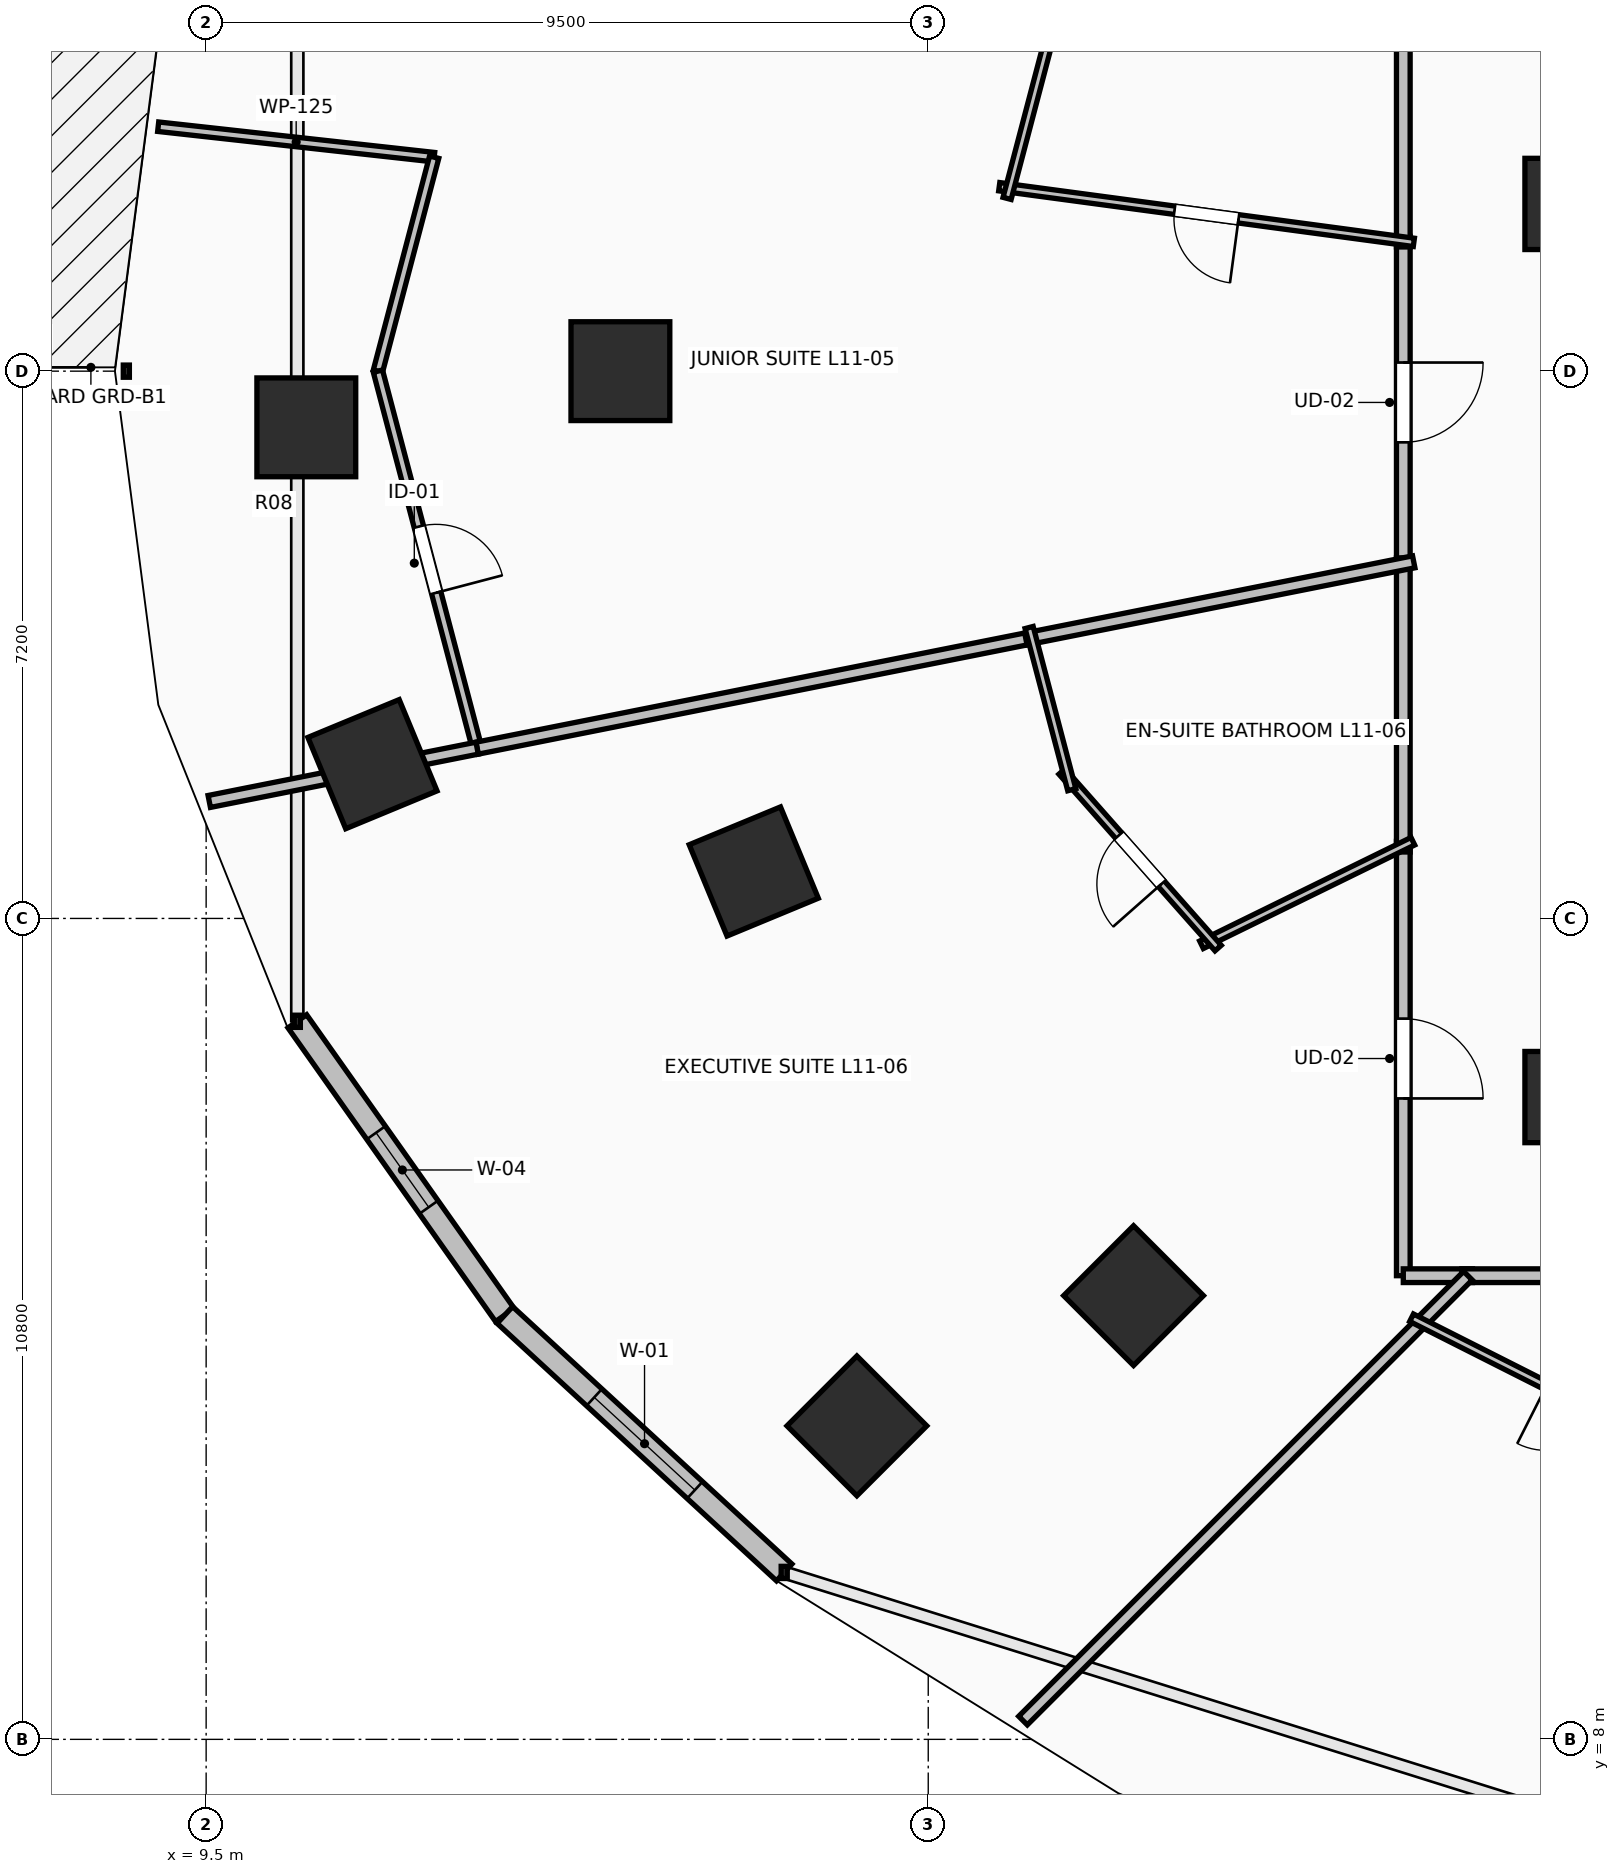
"""IFC4 building model, lengths in metres.
Left out: names, types, materials, properties, quantities, classifications, styles, units other than length and angle.
Written with IfcOpenShell. Run it as: python <this file> out.ifc"""

import sys

from ifc_helpers import new_model, si_unit, direction, frame, frame_2d, origin, origin_2d, place, context, subcontext, project, spatial, rectangle, extrude, element, fill, save


model = new_model("IFC4")
c1 = context("Model", 3, precision=1e-05, world=origin(), true_north=direction((0.0, 1.0)))
c2 = subcontext(c1, "Body", "Model", "MODEL_VIEW")
j1 = project(units=[si_unit("LENGTHUNIT", "METRE"), si_unit("PLANEANGLEUNIT", "RADIAN")], contexts=[c1])
p1 = place(None, origin())
s1 = spatial("IfcSite", under=j1, at=p1, CompositionType="ELEMENT")
p2 = place(p1, origin())
s2 = spatial("IfcBuilding", under=s1, at=p2, CompositionType="ELEMENT")
p3 = place(p2, frame((0.0, 0.0, 45.0)))
s3 = spatial("IfcBuildingStorey", under=s2, at=p3, CompositionType="ELEMENT", Elevation=45.0)
for number, where, z_axis, x_axis in (
    (1, (14.95, 26.0, 0.0), (0.0, 0.0, 1.0), (-1.0, 0.0, 0.0)),
    (2, (16.705, 19.418, 0.0), (0.0, 0.0, 1.0), (-0.924, -0.383, 0.0)),
    (3, (21.701, 13.838, 0.0), (0.0, 0.0, 1.0), (-0.707, -0.707, 0.0)),
    (4, (10.818, 25.261, 0.0), (0.0, 0.0, 1.0), (-1.0, 0.0, 0.0)),
    (5, (11.688, 20.83, 0.0), (0.0, 0.0, 1.0), (-0.924, -0.383, 0.0)),
    (6, (18.061, 12.124, 0.0), (0.0, 0.0, 1.0), (-0.707, -0.707, 0.0)),
):
    element("IfcColumn", number, at=place(p3, frame(where, z_axis=z_axis, x_axis=x_axis)), inside=s3, PredefinedType="COLUMN", context=c2, shape_type="SweptSolid", body=[
        extrude(rectangle(XDim=1.3, YDim=1.3, at=origin_2d()), origin(), (0.0, 0.0, 1.0), 3.5),
    ])
for number, where, z_axis, x_axis in (
    (7, (27.25, 16.45, 0.0), (0.0, 0.0, 1.0), (1.0, 0.0, 0.0)),
    (8, (27.25, 28.2, 0.0), (0.0, 0.0, 1.0), (1.0, 0.0, 0.0)),
):
    element("IfcColumn", number, at=place(p3, frame(where, z_axis=z_axis, x_axis=x_axis)), inside=s3, PredefinedType="PILASTER", context=c2, shape_type="SweptSolid", body=[
        extrude(rectangle(XDim=0.8, YDim=1.2, at=origin_2d()), origin(), (0.0, 0.0, 1.0), 3.5),
    ])
p4 = place(p3, frame((10.699, 17.447, 0.0), z_axis=(0.0, 0.0, 1.0), x_axis=(0.577130815624, -0.816651713803, 0.0)))
e9 = element("IfcWall", 9, at=p4, inside=s3, PredefinedType="STANDARD", context=c2, shape_type="SweptSolid", body=[
    extrude(rectangle(XDim=4.731, YDim=0.3, at=frame_2d((2.366, 0.0))), origin(), (0.0, 0.0, 1.0), 3.24),
])
p5 = place(p4, frame((1.795, 0.0, 0.85)))
e10 = element("IfcOpeningElement", 10, at=p5, cuts=e9, PredefinedType="OPENING", context=c2, shape_type="SweptSolid", body=[
    extrude(rectangle(XDim=1.2, YDim=1.95, at=frame_2d((0.6, 0.975))), frame((0.0, 0.165, 0.0), z_axis=(0.0, -1.0, 0.0), x_axis=(1.0, 0.0, 0.0)), (0.0, 0.0, 1.0), 0.33),
])
p6 = place(p3, frame((13.43, 13.583, 0.0), z_axis=(0.0, 0.0, 1.0), x_axis=(0.735342629635, -0.677695519419, 0.0)))
e11 = element("IfcWall", 11, at=p6, inside=s3, PredefinedType="STANDARD", context=c2, shape_type="SweptSolid", body=[
    extrude(rectangle(XDim=4.997, YDim=0.3, at=frame_2d((2.499, 0.0))), origin(), (0.0, 0.0, 1.0), 3.24),
])
p7 = place(p6, frame((1.599, 0.0, 0.85)))
e12 = element("IfcOpeningElement", 12, at=p7, cuts=e11, PredefinedType="OPENING", context=c2, shape_type="SweptSolid", body=[
    extrude(rectangle(XDim=1.8, YDim=2.19, at=frame_2d((0.9, 1.095))), frame((0.0, 0.165, 0.0), z_axis=(0.0, -1.0, 0.0), x_axis=(1.0, 0.0, 0.0)), (0.0, 0.0, 1.0), 0.33),
])
p8 = place(p3, frame((25.25, 27.774, 0.0), z_axis=(0.0, 0.0, 1.0), x_axis=(0.0, -1.0, 0.0)))
e13 = element("IfcWall", 13, at=p8, inside=s3, PredefinedType="PARTITIONING", context=c2, shape_type="SweptSolid", body=[
    extrude(rectangle(XDim=4.371, YDim=0.18, at=frame_2d((2.186, 0.0))), origin(), (0.0, 0.0, 1.0), 2.432),
])
p9 = place(p8, frame((1.66, 0.0, 0.0)))
e14 = element("IfcOpeningElement", 14, at=p9, cuts=e13, PredefinedType="OPENING", context=c2, shape_type="SweptSolid", body=[
    extrude(rectangle(XDim=1.05, YDim=2.2, at=frame_2d((0.525, 1.1))), frame((0.0, 0.105, 0.0), z_axis=(0.0, -1.0, 0.0), x_axis=(1.0, 0.0, 0.0)), (0.0, 0.0, 1.0), 0.21),
])
p10 = place(p3, frame((25.25, 31.361, 0.0), z_axis=(0.0, 0.0, 1.0), x_axis=(0.0, -1.0, 0.0)))
e15 = element("IfcWall", 15, at=p10, inside=s3, PredefinedType="PARTITIONING", context=c2, shape_type="SweptSolid", body=[
    extrude(rectangle(XDim=3.727, YDim=0.18, at=frame_2d((1.864, 0.0))), origin(), (0.0, 0.0, 1.0), 2.432),
])
p11 = place(p3, frame((25.25, 19.814, 0.0), z_axis=(0.0, 0.0, 1.0), x_axis=(0.0, -1.0, 0.0)))
e16 = element("IfcWall", 16, at=p11, inside=s3, PredefinedType="PARTITIONING", context=c2, shape_type="SweptSolid", body=[
    extrude(rectangle(XDim=5.714, YDim=0.18, at=frame_2d((2.857, 0.0))), origin(), (0.0, 0.0, 1.0), 2.432),
])
p12 = place(p11, frame((2.332, 0.0, 0.0)))
e17 = element("IfcOpeningElement", 17, at=p12, cuts=e16, PredefinedType="OPENING", context=c2, shape_type="SweptSolid", body=[
    extrude(rectangle(XDim=1.05, YDim=2.2, at=frame_2d((0.525, 1.1))), frame((0.0, 0.105, 0.0), z_axis=(0.0, -1.0, 0.0), x_axis=(1.0, 0.0, 0.0)), (0.0, 0.0, 1.0), 0.21),
])
p13 = place(p3, frame((25.25, 14.1, 0.0), z_axis=(0.0, 0.0, 1.0), x_axis=(1.0, 0.0, 0.0)))
e18 = element("IfcWall", 18, at=p13, inside=s3, PredefinedType="PARTITIONING", context=c2, shape_type="SweptSolid", body=[
    extrude(rectangle(XDim=0.91, YDim=0.18, at=frame_2d((0.455, 0.0))), origin(), (0.0, 0.0, 1.0), 2.886),
])
p14 = place(p3, frame((25.25, 23.543, 0.0), z_axis=(0.0, 0.0, 1.0), x_axis=(0.0, -1.0, 0.0)))
e19 = element("IfcWall", 19, at=p14, inside=s3, PredefinedType="PARTITIONING", context=c2, shape_type="SweptSolid", body=[
    extrude(rectangle(XDim=3.869, YDim=0.18, at=frame_2d((1.935, 0.0))), origin(), (0.0, 0.0, 1.0), 3.24),
])
p15 = place(p3, frame((26.02, 14.1, 0.0), z_axis=(0.0, 0.0, 1.0), x_axis=(1.0, 0.0, 0.0)))
e20 = element("IfcWall", 20, at=p15, inside=s3, PredefinedType="PARTITIONING", context=c2, shape_type="SweptSolid", body=[
    extrude(rectangle(XDim=5.139, YDim=0.18, at=frame_2d((2.569, 0.0))), origin(), (0.0, 0.0, 1.0), 2.432),
])
p16 = place(p3, frame((25.389, 27.694, 0.0), z_axis=(0.0, 0.0, 1.0), x_axis=(-0.991111683087, 0.133032445848, 0.0)))
e21 = element("IfcWall", 21, at=p16, inside=s3, PredefinedType="PARTITIONING", context=c2, shape_type="SweptSolid", body=[
    extrude(rectangle(XDim=5.504, YDim=0.11, at=frame_2d((2.752, 0.0))), origin(), (0.0, 0.0, 1.0), 2.432),
])
p17 = place(p16, frame((2.327, 0.0, 0.0)))
e22 = element("IfcOpeningElement", 22, at=p17, cuts=e21, PredefinedType="OPENING", context=c2, shape_type="SweptSolid", body=[
    extrude(rectangle(XDim=0.85, YDim=2.1, at=frame_2d((0.425, 1.05))), frame((0.0, 0.07, 0.0), z_axis=(0.0, -1.0, 0.0), x_axis=(1.0, 0.0, 0.0)), (0.0, 0.0, 1.0), 0.14),
])
p18 = place(p3, frame((20.037, 28.273, 0.0), z_axis=(0.0, 0.0, 1.0), x_axis=(0.254593926267, 0.967048050878, 0.0)))
e23 = element("IfcWall", 23, at=p18, inside=s3, PredefinedType="PARTITIONING", context=c2, shape_type="SweptSolid", body=[
    extrude(rectangle(XDim=3.344, YDim=0.11, at=frame_2d((1.672, 0.0))), origin(), (0.0, 0.0, 1.0), 2.432),
])
p19 = place(p3, frame((8.869, 29.216, 0.0), z_axis=(0.0, 0.0, 1.0), x_axis=(0.99395362386, -0.109800699523, 0.0)))
e24 = element("IfcWall", 24, at=p19, inside=s3, PredefinedType="PARTITIONING", context=c2, shape_type="SweptSolid", body=[
    extrude(rectangle(XDim=3.653, YDim=0.125, at=frame_2d((1.827, 0.0))), origin(), (0.0, 0.0, 1.0), 2.624),
])
p20 = place(p3, frame((12.5, 28.815, 0.0), z_axis=(0.0, 0.0, 1.0), x_axis=(-0.254241432202, -0.967140783005, 0.0)))
e25 = element("IfcWall", 25, at=p20, inside=s3, PredefinedType="PARTITIONING", context=c2, shape_type="SweptSolid", body=[
    extrude(rectangle(XDim=2.911, YDim=0.125, at=frame_2d((1.455, 0.0))), origin(), (0.0, 0.0, 1.0), 3.24),
])
p21 = place(p3, frame((11.76, 26.0, 0.0), z_axis=(0.0, 0.0, 1.0), x_axis=(0.254434720755, -0.967089950767, 0.0)))
e26 = element("IfcWall", 26, at=p21, inside=s3, PredefinedType="PARTITIONING", context=c2, shape_type="SweptSolid", body=[
    extrude(rectangle(XDim=5.129, YDim=0.125, at=frame_2d((2.564, 0.0))), origin(), (0.0, 0.0, 1.0), 2.432),
])
p22 = place(p21, frame((2.115, 0.0, 0.0)))
e27 = element("IfcOpeningElement", 27, at=p22, cuts=e26, PredefinedType="OPENING", context=c2, shape_type="SweptSolid", body=[
    extrude(rectangle(XDim=0.9, YDim=2.1, at=frame_2d((0.45, 1.05))), frame((0.0, 0.077, 0.0), z_axis=(0.0, -1.0, 0.0), x_axis=(1.0, 0.0, 0.0)), (0.0, 0.0, 1.0), 0.155),
])
p23 = place(p3, frame((13.065, 21.04, 0.0), z_axis=(0.0, 0.0, 1.0), x_axis=(0.980774220135, 0.195145917502, 0.0)))
e28 = element("IfcWall", 28, at=p23, inside=s3, PredefinedType="PARTITIONING", context=c2, shape_type="SweptSolid", body=[
    extrude(rectangle(XDim=7.501, YDim=0.16, at=frame_2d((3.751, 0.0))), origin(), (0.0, 0.0, 1.0), 2.972),
])
p24 = place(p3, frame((20.285, 22.476, 0.0), z_axis=(0.0, 0.0, 1.0), x_axis=(0.980785905074, 0.195087181559, 0.0)))
e29 = element("IfcWall", 29, at=p24, inside=s3, PredefinedType="PARTITIONING", context=c2, shape_type="SweptSolid", body=[
    extrude(rectangle(XDim=5.202, YDim=0.16, at=frame_2d((2.601, 0.0))), origin(), (0.0, 0.0, 1.0), 2.886),
])
p25 = place(p3, frame((9.541, 20.339, 0.0), z_axis=(0.0, 0.0, 1.0), x_axis=(0.980786594985, 0.195083713053, 0.0)))
e30 = element("IfcWall", 30, at=p25, inside=s3, PredefinedType="PARTITIONING", context=c2, shape_type="SweptSolid", body=[
    extrude(rectangle(XDim=3.593, YDim=0.16, at=frame_2d((1.796, 0.0))), origin(), (0.0, 0.0, 1.0), 2.432),
])
p26 = place(p3, frame((25.376, 19.816, 0.0), z_axis=(0.0, 0.0, 1.0), x_axis=(-0.89800930559, -0.439976461954, 0.0)))
e31 = element("IfcWall", 31, at=p26, inside=s3, PredefinedType="PARTITIONING", context=c2, shape_type="SweptSolid", body=[
    extrude(rectangle(XDim=3.096, YDim=0.11, at=frame_2d((1.548, 0.0))), origin(), (0.0, 0.0, 1.0), 3.24),
])
p27 = place(p3, frame((22.814, 18.41, 0.0), z_axis=(0.0, 0.0, 1.0), x_axis=(-0.662186487972, 0.749339078887, 0.0)))
e32 = element("IfcWall", 32, at=p27, inside=s3, PredefinedType="PARTITIONING", context=c2, shape_type="SweptSolid", body=[
    extrude(rectangle(XDim=3.101, YDim=0.11, at=frame_2d((1.551, 0.0))), origin(), (0.0, 0.0, 1.0), 2.886),
])
p28 = place(p27, frame((1.125, 0.0, 0.0)))
e33 = element("IfcOpeningElement", 33, at=p28, cuts=e32, PredefinedType="OPENING", context=c2, shape_type="SweptSolid", body=[
    extrude(rectangle(XDim=0.85, YDim=2.1, at=frame_2d((0.425, 1.05))), frame((0.0, 0.07, 0.0), z_axis=(0.0, -1.0, 0.0), x_axis=(1.0, 0.0, 0.0)), (0.0, 0.0, 1.0), 0.14),
])
p29 = place(p3, frame((20.889, 20.494, 0.0), z_axis=(0.0, 0.0, 1.0), x_axis=(-0.254389812051, 0.967101764823, 0.0)))
e34 = element("IfcWall", 34, at=p29, inside=s3, PredefinedType="PARTITIONING", context=c2, shape_type="SweptSolid", body=[
    extrude(rectangle(XDim=2.206, YDim=0.11, at=frame_2d((1.103, 0.0))), origin(), (0.0, 0.0, 1.0), 3.24),
])
p30 = place(p3, frame((20.247, 8.247, 0.0), z_axis=(0.0, 0.0, 1.0), x_axis=(0.707106781187, 0.707106781187, 0.0)))
e35 = element("IfcWall", 35, at=p30, inside=s3, PredefinedType="PARTITIONING", context=c2, shape_type="SweptSolid", body=[
    extrude(rectangle(XDim=8.277, YDim=0.16, at=frame_2d((4.139, 0.0))), origin(), (0.0, 0.0, 1.0), 2.624),
])
p31 = place(p3, frame((29.665, 11.372, 0.0), z_axis=(0.0, 0.0, 1.0), x_axis=(-0.892577568201, 0.450893873039, 0.0)))
e36 = element("IfcWall", 36, at=p31, inside=s3, PredefinedType="PARTITIONING", context=c2, shape_type="SweptSolid", body=[
    extrude(rectangle(XDim=4.824, YDim=0.11, at=frame_2d((2.412, 0.0))), origin(), (0.0, 0.0, 1.0), 2.432),
])
p32 = place(p31, frame((1.987, 0.0, 0.0)))
e37 = element("IfcOpeningElement", 37, at=p32, cuts=e36, PredefinedType="OPENING", context=c2, shape_type="SweptSolid", body=[
    extrude(rectangle(XDim=0.85, YDim=2.1, at=frame_2d((0.425, 1.05))), frame((0.0, 0.07, 0.0), z_axis=(0.0, -1.0, 0.0), x_axis=(1.0, 0.0, 0.0)), (0.0, 0.0, 1.0), 0.14),
])
p33 = place(p5, origin())
e38 = element("IfcWindow", 38, at=p33, inside=s3, PartitioningType="SINGLE_PANEL", PredefinedType="WINDOW", context=c2, shape_type="SweptSolid", body=[
    extrude(rectangle(XDim=1.2, YDim=1.95, at=frame_2d((0.6, 0.975))), frame((0.0, 0.03, 0.0), z_axis=(0.0, -1.0, 0.0), x_axis=(1.0, 0.0, 0.0)), (0.0, 0.0, 1.0), 0.06),
])
fill(e10, e38)
p34 = place(p7, origin())
e39 = element("IfcWindow", 39, at=p34, inside=s3, PartitioningType="SINGLE_PANEL", PredefinedType="WINDOW", context=c2, shape_type="SweptSolid", body=[
    extrude(rectangle(XDim=1.8, YDim=2.19, at=frame_2d((0.9, 1.095))), frame((0.0, 0.03, 0.0), z_axis=(0.0, -1.0, 0.0), x_axis=(1.0, 0.0, 0.0)), (0.0, 0.0, 1.0), 0.06),
])
fill(e12, e39)
p35 = place(p9, origin())
e40 = element("IfcDoor", 40, at=p35, inside=s3, OperationType="SINGLE_SWING_LEFT", PredefinedType="DOOR", context=c2, shape_type="SweptSolid", body=[
    extrude(rectangle(XDim=1.05, YDim=2.2, at=frame_2d((0.525, 1.1))), frame((0.0, 0.025, 0.0), z_axis=(0.0, -1.0, 0.0), x_axis=(1.0, 0.0, 0.0)), (0.0, 0.0, 1.0), 0.05),
])
fill(e14, e40)
p36 = place(p12, origin())
e41 = element("IfcDoor", 41, at=p36, inside=s3, OperationType="SINGLE_SWING_RIGHT", PredefinedType="DOOR", context=c2, shape_type="SweptSolid", body=[
    extrude(rectangle(XDim=1.05, YDim=2.2, at=frame_2d((0.525, 1.1))), frame((0.0, 0.025, 0.0), z_axis=(0.0, -1.0, 0.0), x_axis=(1.0, 0.0, 0.0)), (0.0, 0.0, 1.0), 0.05),
])
fill(e17, e41)
p37 = place(p17, origin())
e42 = element("IfcDoor", 42, at=p37, inside=s3, OperationType="SINGLE_SWING_LEFT", PredefinedType="DOOR", context=c2, shape_type="SweptSolid", body=[
    extrude(rectangle(XDim=0.85, YDim=2.1, at=frame_2d((0.425, 1.05))), frame((0.0, 0.025, 0.0), z_axis=(0.0, -1.0, 0.0), x_axis=(1.0, 0.0, 0.0)), (0.0, 0.0, 1.0), 0.05),
])
fill(e22, e42)
p38 = place(p22, origin())
e43 = element("IfcDoor", 43, at=p38, inside=s3, OperationType="SINGLE_SWING_RIGHT", PredefinedType="DOOR", context=c2, shape_type="SweptSolid", body=[
    extrude(rectangle(XDim=0.9, YDim=2.1, at=frame_2d((0.45, 1.05))), frame((0.0, 0.025, 0.0), z_axis=(0.0, -1.0, 0.0), x_axis=(1.0, 0.0, 0.0)), (0.0, 0.0, 1.0), 0.05),
])
fill(e27, e43)
p39 = place(p28, origin())
e44 = element("IfcDoor", 44, at=p39, inside=s3, OperationType="SINGLE_SWING_LEFT", PredefinedType="DOOR", context=c2, shape_type="SweptSolid", body=[
    extrude(rectangle(XDim=0.85, YDim=2.1, at=frame_2d((0.425, 1.05))), frame((0.0, 0.025, 0.0), z_axis=(0.0, -1.0, 0.0), x_axis=(1.0, 0.0, 0.0)), (0.0, 0.0, 1.0), 0.05),
])
fill(e33, e44)
save(model, sys.argv[1])
